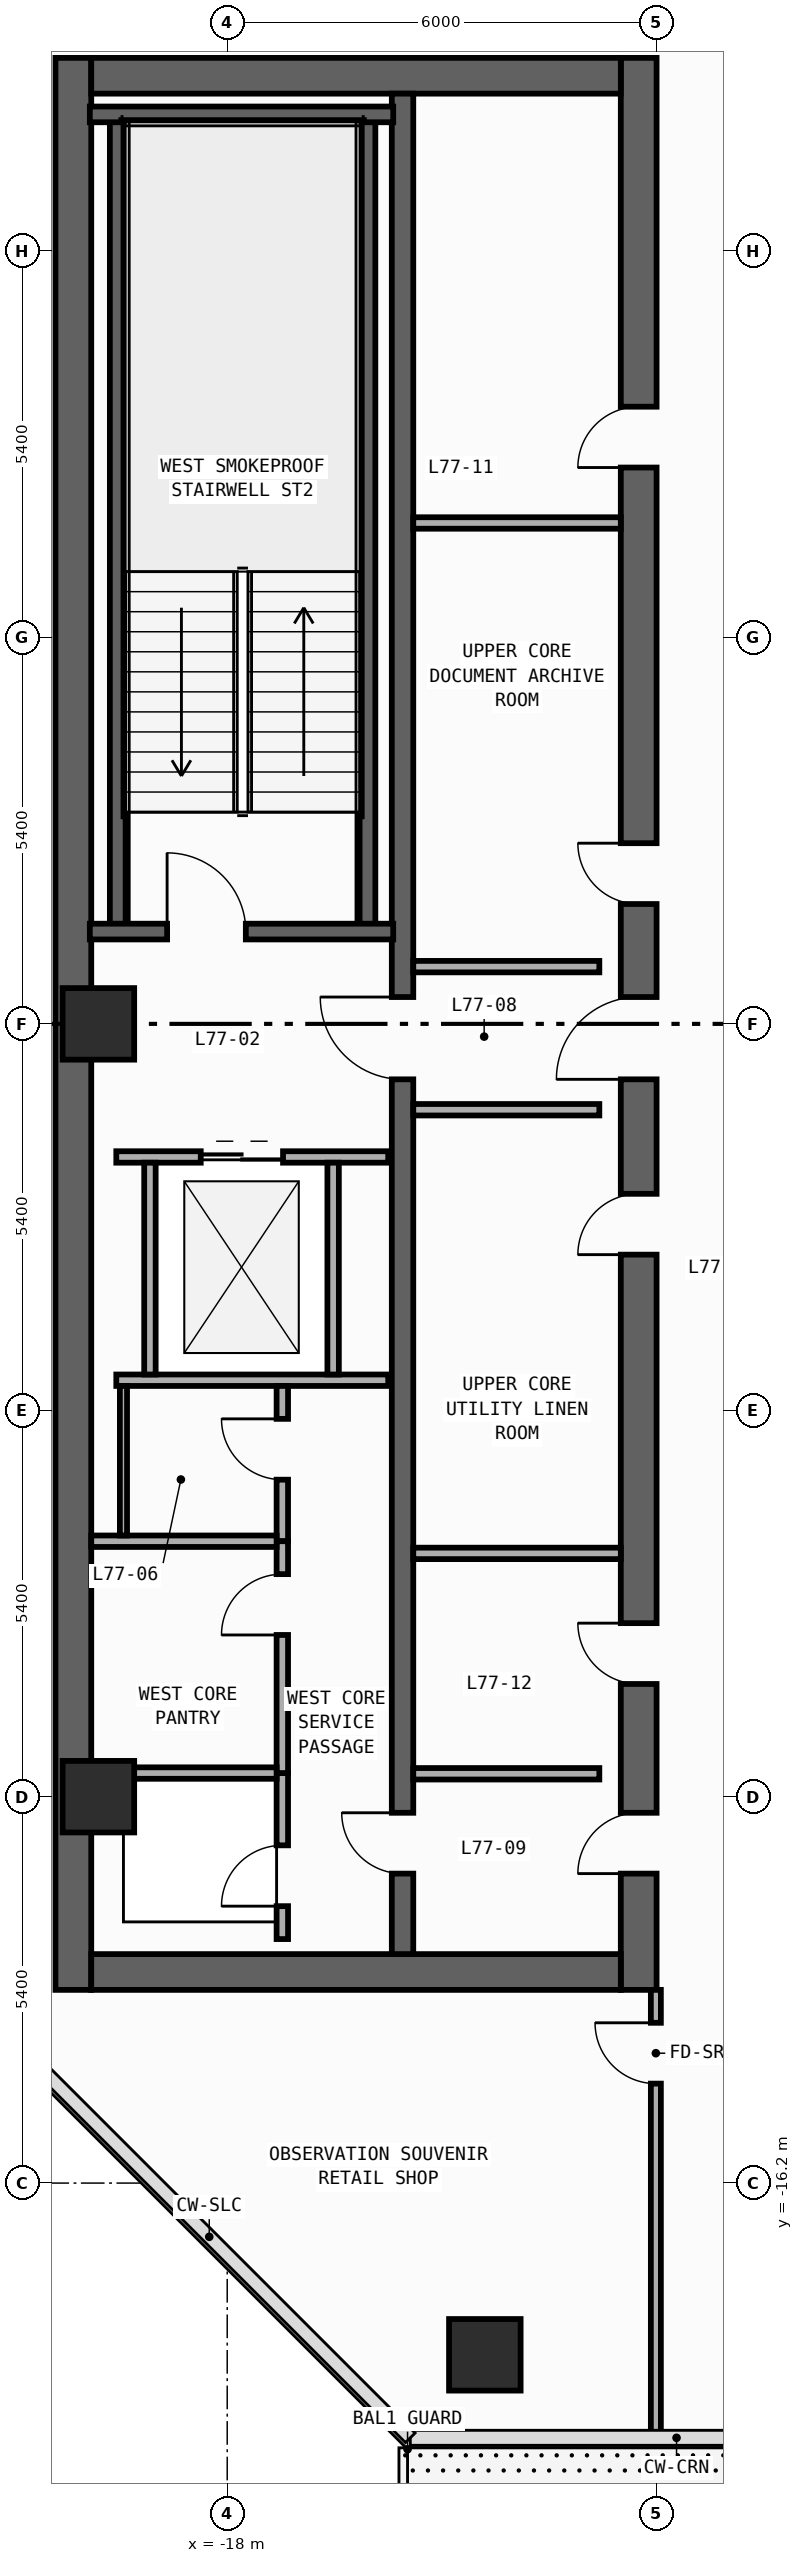
"""IFC4 building model, lengths in metres.
Left out: names, types, materials, properties, quantities, classifications, styles, units other than length and angle.
Written with IfcOpenShell. Run it as: python <this file> out.ifc"""

import sys

from ifc_helpers import new_model, si_unit, direction, frame, frame_2d, origin, origin_2d, place, context, subcontext, project, spatial, rectangle, circle, extrude, element, fill, save


model = new_model("IFC4")
c1 = context("Model", 3, precision=1e-05, world=origin(), true_north=direction((0.0, 1.0)))
c2 = subcontext(c1, "Body", "Model", "MODEL_VIEW")
j1 = project(units=[si_unit("LENGTHUNIT", "METRE"), si_unit("PLANEANGLEUNIT", "RADIAN")], contexts=[c1])
p1 = place(None, origin())
s1 = spatial("IfcSite", under=j1, at=p1, CompositionType="ELEMENT")
p2 = place(p1, origin())
s2 = spatial("IfcBuilding", under=s1, at=p2, CompositionType="ELEMENT")
p3 = place(p2, frame((0.0, 0.0, 320.4)))
s3 = spatial("IfcBuildingStorey", under=s2, at=p3, CompositionType="ELEMENT", Elevation=320.4)
p4 = place(p3, frame((-20.15, -13.5, 0.0), z_axis=(0.0, 0.0, 1.0), x_axis=(0.0, 1.0, 0.0)))
e1 = element("IfcWall", 1, at=p4, inside=s3, PredefinedType="SHEAR", context=c2, shape_type="SweptSolid", body=[
    extrude(rectangle(XDim=27.0, YDim=0.5, at=frame_2d((13.5, 0.0))), origin(), (0.0, 0.0, 1.0), 4.45),
])
p5 = place(p3, frame((-12.25, -13.5, 0.0), z_axis=(0.0, 0.0, 1.0), x_axis=(0.0, 1.0, 0.0)))
e2 = element("IfcWall", 2, at=p5, inside=s3, PredefinedType="SHEAR", context=c2, shape_type="SweptSolid", body=[
    extrude(rectangle(XDim=27.0, YDim=0.5, at=frame_2d((13.5, 0.0))), origin(), (0.0, 0.0, 1.0), 4.45),
])
p6 = place(p5, frame((15.175, 0.0, 0.0)))
e3 = element("IfcOpeningElement", 3, at=p6, cuts=e2, PredefinedType="OPENING", context=c2, shape_type="SweptSolid", body=[
    extrude(rectangle(XDim=0.85, YDim=2.1, at=frame_2d((0.425, 1.05))), frame((0.0, 0.26, 0.0), z_axis=(0.0, -1.0, 0.0), x_axis=(1.0, 0.0, 0.0)), (0.0, 0.0, 1.0), 0.52),
])
p7 = place(p5, frame((21.275, 0.0, 0.0)))
e4 = element("IfcOpeningElement", 4, at=p7, cuts=e2, PredefinedType="OPENING", context=c2, shape_type="SweptSolid", body=[
    extrude(rectangle(XDim=0.85, YDim=2.1, at=frame_2d((0.425, 1.05))), frame((0.0, 0.26, 0.0), z_axis=(0.0, -1.0, 0.0), x_axis=(1.0, 0.0, 0.0)), (0.0, 0.0, 1.0), 0.52),
])
p8 = place(p5, frame((4.275, 0.0, 0.0)))
e5 = element("IfcOpeningElement", 5, at=p8, cuts=e2, PredefinedType="OPENING", context=c2, shape_type="SweptSolid", body=[
    extrude(rectangle(XDim=0.85, YDim=2.1, at=frame_2d((0.425, 1.05))), frame((0.0, 0.26, 0.0), z_axis=(0.0, -1.0, 0.0), x_axis=(1.0, 0.0, 0.0)), (0.0, 0.0, 1.0), 0.52),
])
p9 = place(p5, frame((10.275, 0.0, 0.0)))
e6 = element("IfcOpeningElement", 6, at=p9, cuts=e2, PredefinedType="OPENING", context=c2, shape_type="SweptSolid", body=[
    extrude(rectangle(XDim=0.85, YDim=2.1, at=frame_2d((0.425, 1.05))), frame((0.0, 0.26, 0.0), z_axis=(0.0, -1.0, 0.0), x_axis=(1.0, 0.0, 0.0)), (0.0, 0.0, 1.0), 0.52),
])
p10 = place(p5, frame((12.725, 0.0, 0.0)))
e7 = element("IfcOpeningElement", 7, at=p10, cuts=e2, PredefinedType="OPENING", context=c2, shape_type="SweptSolid", body=[
    extrude(rectangle(XDim=1.15, YDim=2.2, at=frame_2d((0.575, 1.1))), frame((0.0, 0.26, 0.0), z_axis=(0.0, -1.0, 0.0), x_axis=(1.0, 0.0, 0.0)), (0.0, 0.0, 1.0), 0.52),
])
p11 = place(p5, frame((1.625, 0.0, 0.0)))
e8 = element("IfcOpeningElement", 8, at=p11, cuts=e2, PredefinedType="OPENING", context=c2, shape_type="SweptSolid", body=[
    extrude(rectangle(XDim=0.85, YDim=2.1, at=frame_2d((0.425, 1.05))), frame((0.0, 0.26, 0.0), z_axis=(0.0, -1.0, 0.0), x_axis=(1.0, 0.0, 0.0)), (0.0, 0.0, 1.0), 0.52),
])
for number, where, z_axis, x_axis in (
    (9, (-19.9, -13.25, 0.0), (0.0, 0.0, 1.0), (1.0, 0.0, 0.0)),
    (10, (-19.9, 13.25, 0.0), (0.0, 0.0, 1.0), (1.0, 0.0, 0.0)),
):
    element("IfcWall", number, at=place(p3, frame(where, z_axis=z_axis, x_axis=x_axis)), inside=s3, PredefinedType="SHEAR", context=c2, shape_type="SweptSolid", body=[
        extrude(rectangle(XDim=7.4, YDim=0.5, at=frame_2d((3.7, 0.0))), origin(), (0.0, 0.0, 1.0), 4.45),
    ])
p12 = place(p3, frame((-15.55, -13.0, 0.0), z_axis=(0.0, 0.0, 1.0), x_axis=(0.0, 1.0, 0.0)))
e11 = element("IfcWall", 11, at=p12, inside=s3, PredefinedType="SHEAR", context=c2, shape_type="SweptSolid", body=[
    extrude(rectangle(XDim=26.0, YDim=0.3, at=frame_2d((13.0, 0.0))), origin(), (0.0, 0.0, 1.0), 4.45),
])
p13 = place(p12, frame((12.225, 0.0, 0.0)))
e12 = element("IfcOpeningElement", 12, at=p13, cuts=e11, PredefinedType="OPENING", context=c2, shape_type="SweptSolid", body=[
    extrude(rectangle(XDim=1.15, YDim=2.2, at=frame_2d((0.575, 1.1))), frame((0.0, 0.16, 0.0), z_axis=(0.0, -1.0, 0.0), x_axis=(1.0, 0.0, 0.0)), (0.0, 0.0, 1.0), 0.32),
])
p14 = place(p12, frame((1.125, 0.0, 0.0)))
e13 = element("IfcOpeningElement", 13, at=p14, cuts=e11, PredefinedType="OPENING", context=c2, shape_type="SweptSolid", body=[
    extrude(rectangle(XDim=0.85, YDim=2.1, at=frame_2d((0.425, 1.05))), frame((0.0, 0.16, 0.0), z_axis=(0.0, -1.0, 0.0), x_axis=(1.0, 0.0, 0.0)), (0.0, 0.0, 1.0), 0.32),
])
for number, where, z_axis, x_axis in (
    (14, (-16.04, 1.29, 0.0), (0.0, 0.0, 1.0), (0.0, 1.0, 0.0)),
    (15, (-19.53, 1.29, 0.0), (0.0, 0.0, 1.0), (0.0, 1.0, 0.0)),
):
    element("IfcWall", number, at=place(p3, frame(where, z_axis=z_axis, x_axis=x_axis)), inside=s3, PredefinedType="SHEAR", context=c2, shape_type="SweptSolid", body=[
        extrude(rectangle(XDim=11.42, YDim=0.22, at=frame_2d((5.71, 0.0))), origin(), (0.0, 0.0, 1.0), 4.45),
    ])
p15 = place(p3, frame((-19.92, 12.71, 0.0), z_axis=(0.0, 0.0, 1.0), x_axis=(1.0, 0.0, 0.0)))
e16 = element("IfcWall", 16, at=p15, inside=s3, PredefinedType="SHEAR", context=c2, shape_type="SweptSolid", body=[
    extrude(rectangle(XDim=4.24, YDim=0.22, at=frame_2d((2.12, 0.0))), origin(), (0.0, 0.0, 1.0), 4.45),
])
p16 = place(p3, frame((-19.92, 1.29, 0.0), z_axis=(0.0, 0.0, 1.0), x_axis=(1.0, 0.0, 0.0)))
e17 = element("IfcWall", 17, at=p16, inside=s3, PredefinedType="SHEAR", context=c2, shape_type="SweptSolid", body=[
    extrude(rectangle(XDim=4.24, YDim=0.22, at=frame_2d((2.12, 0.0))), origin(), (0.0, 0.0, 1.0), 4.45),
])
p17 = place(p16, frame((1.08, 0.0, 0.0)))
e18 = element("IfcOpeningElement", 18, at=p17, cuts=e17, PredefinedType="OPENING", context=c2, shape_type="SweptSolid", body=[
    extrude(rectangle(XDim=1.1, YDim=2.2, at=frame_2d((0.55, 1.1))), frame((0.0, 0.12, 0.0), z_axis=(0.0, -1.0, 0.0), x_axis=(1.0, 0.0, 0.0)), (0.0, 0.0, 1.0), 0.24),
])
for number, where, z_axis, x_axis in (
    (19, (-14.4, -18.6, 0.0), (0.0, 0.0, 1.0), (1.0, 0.0, 0.0)),
    (20, (-19.8, -10.8, 0.0), (0.0, 0.0, 1.0), (1.0, 0.0, 0.0)),
    (21, (-19.8, 0.0, 0.0), (0.0, 0.0, 1.0), (1.0, 0.0, 0.0)),
):
    element("IfcColumn", number, at=place(p3, frame(where, z_axis=z_axis, x_axis=x_axis)), inside=s3, PredefinedType="COLUMN", context=c2, shape_type="SweptSolid", body=[
        extrude(circle(Radius=0.5, at=origin_2d()), origin(), (0.0, 0.0, 1.0), 4.8),
    ])
p18 = place(p3, frame((-19.55, -1.86, 0.0), z_axis=(0.0, 0.0, 1.0), x_axis=(1.0, 0.0, 0.0)))
e22 = element("IfcWall", 22, at=p18, inside=s3, PredefinedType="STANDARD", context=c2, shape_type="SweptSolid", body=[
    extrude(rectangle(XDim=3.8, YDim=0.16, at=frame_2d((1.9, 0.0))), origin(), (0.0, 0.0, 1.0), 4.45),
])
p19 = place(p18, frame((1.18, 0.0, 0.0)))
e23 = element("IfcOpeningElement", 23, at=p19, cuts=e22, PredefinedType="OPENING", context=c2, shape_type="SweptSolid", body=[
    extrude(rectangle(XDim=1.15, YDim=2.2, at=frame_2d((0.575, 1.1))), frame((0.0, 0.09, 0.0), z_axis=(0.0, -1.0, 0.0), x_axis=(1.0, 0.0, 0.0)), (0.0, 0.0, 1.0), 0.18),
])
p20 = place(p3, frame((-19.55, -4.98, 0.0), z_axis=(0.0, 0.0, 1.0), x_axis=(1.0, 0.0, 0.0)))
e24 = element("IfcWall", 24, at=p20, inside=s3, PredefinedType="STANDARD", context=c2, shape_type="SweptSolid", body=[
    extrude(rectangle(XDim=3.8, YDim=0.16, at=frame_2d((1.9, 0.0))), origin(), (0.0, 0.0, 1.0), 4.45),
])
for number, where, z_axis, x_axis in (
    (25, (-19.08, -4.9, 0.0), (0.0, 0.0, 1.0), (0.0, 1.0, 0.0)),
    (26, (-16.52, -4.9, 0.0), (0.0, 0.0, 1.0), (0.0, 1.0, 0.0)),
):
    element("IfcWall", number, at=place(p3, frame(where, z_axis=z_axis, x_axis=x_axis)), inside=s3, PredefinedType="STANDARD", context=c2, shape_type="SweptSolid", body=[
        extrude(rectangle(XDim=2.96, YDim=0.16, at=frame_2d((1.48, 0.0))), origin(), (0.0, 0.0, 1.0), 4.45),
    ])
for number, where, z_axis, x_axis in (
    (27, (-15.4, 0.8, 0.0), (0.0, 0.0, 1.0), (1.0, 0.0, 0.0)),
    (28, (-15.4, -1.2, 0.0), (0.0, 0.0, 1.0), (1.0, 0.0, 0.0)),
    (29, (-15.4, -10.48, 0.0), (0.0, 0.0, 1.0), (1.0, 0.0, 0.0)),
):
    element("IfcWall", number, at=place(p3, frame(where, z_axis=z_axis, x_axis=x_axis)), inside=s3, PredefinedType="STANDARD", context=c2, shape_type="SweptSolid", body=[
        extrude(rectangle(XDim=2.6, YDim=0.16, at=frame_2d((1.3, 0.0))), origin(), (0.0, 0.0, 1.0), 4.45),
    ])
p21 = place(p3, frame((-17.23, -12.79, 0.0), z_axis=(0.0, 0.0, 1.0), x_axis=(0.0, 1.0, 0.0)))
e30 = element("IfcWall", 30, at=p21, inside=s3, PredefinedType="PARTITIONING", context=c2, shape_type="SweptSolid", body=[
    extrude(rectangle(XDim=2.32, YDim=0.16, at=frame_2d((1.16, 0.0))), origin(), (0.0, 0.0, 1.0), 4.45),
])
p22 = place(p21, frame((0.46, 0.0, 0.0)))
e31 = element("IfcOpeningElement", 31, at=p22, cuts=e30, PredefinedType="OPENING", context=c2, shape_type="SweptSolid", body=[
    extrude(rectangle(XDim=0.85, YDim=2.1, at=frame_2d((0.425, 1.05))), frame((0.0, 0.09, 0.0), z_axis=(0.0, -1.0, 0.0), x_axis=(1.0, 0.0, 0.0)), (0.0, 0.0, 1.0), 0.18),
])
p23 = place(p3, frame((-17.23, -7.23, 0.0), z_axis=(0.0, 0.0, 1.0), x_axis=(0.0, 1.0, 0.0)))
e32 = element("IfcWall", 32, at=p23, inside=s3, PredefinedType="PARTITIONING", context=c2, shape_type="SweptSolid", body=[
    extrude(rectangle(XDim=2.17, YDim=0.16, at=frame_2d((1.085, 0.0))), origin(), (0.0, 0.0, 1.0), 4.45),
])
p24 = place(p23, frame((0.86, 0.0, 0.0)))
e33 = element("IfcOpeningElement", 33, at=p24, cuts=e32, PredefinedType="OPENING", context=c2, shape_type="SweptSolid", body=[
    extrude(rectangle(XDim=0.85, YDim=2.1, at=frame_2d((0.425, 1.05))), frame((0.0, 0.09, 0.0), z_axis=(0.0, -1.0, 0.0), x_axis=(1.0, 0.0, 0.0)), (0.0, 0.0, 1.0), 0.18),
])
p25 = place(p3, frame((-17.23, -10.47, 0.0), z_axis=(0.0, 0.0, 1.0), x_axis=(0.0, 1.0, 0.0)))
e34 = element("IfcWall", 34, at=p25, inside=s3, PredefinedType="PARTITIONING", context=c2, shape_type="SweptSolid", body=[
    extrude(rectangle(XDim=3.24, YDim=0.16, at=frame_2d((1.62, 0.0))), origin(), (0.0, 0.0, 1.0), 4.45),
])
p26 = place(p25, frame((1.93, 0.0, 0.0)))
e35 = element("IfcOpeningElement", 35, at=p26, cuts=e34, PredefinedType="OPENING", context=c2, shape_type="SweptSolid", body=[
    extrude(rectangle(XDim=0.85, YDim=2.1, at=frame_2d((0.425, 1.05))), frame((0.0, 0.09, 0.0), z_axis=(0.0, -1.0, 0.0), x_axis=(1.0, 0.0, 0.0)), (0.0, 0.0, 1.0), 0.18),
])
p27 = place(p3, frame((-19.75, -10.47, 0.0), z_axis=(0.0, 0.0, 1.0), x_axis=(1.0, 0.0, 0.0)))
e36 = element("IfcWall", 36, at=p27, inside=s3, PredefinedType="PARTITIONING", context=c2, shape_type="SweptSolid", body=[
    extrude(rectangle(XDim=2.44, YDim=0.16, at=frame_2d((1.22, 0.0))), origin(), (0.0, 0.0, 1.0), 4.45),
])
p28 = place(p3, frame((-19.9, -7.23, 0.0), z_axis=(0.0, 0.0, 1.0), x_axis=(1.0, 0.0, 0.0)))
e37 = element("IfcWall", 37, at=p28, inside=s3, PredefinedType="PARTITIONING", context=c2, shape_type="SweptSolid", body=[
    extrude(rectangle(XDim=2.59, YDim=0.16, at=frame_2d((1.295, 0.0))), origin(), (0.0, 0.0, 1.0), 4.45),
])
for number, where, z_axis, x_axis in (
    (38, (-15.4, 7.0, 0.0), (0.0, 0.0, 1.0), (1.0, 0.0, 0.0)),
    (39, (-15.4, -7.4, 0.0), (0.0, 0.0, 1.0), (1.0, 0.0, 0.0)),
):
    element("IfcWall", number, at=place(p3, frame(where, z_axis=z_axis, x_axis=x_axis)), inside=s3, PredefinedType="PARTITIONING", context=c2, shape_type="SweptSolid", body=[
        extrude(rectangle(XDim=2.9, YDim=0.16, at=frame_2d((1.45, 0.0))), origin(), (0.0, 0.0, 1.0), 4.45),
    ])
p29 = place(p3, frame((-12.01, -19.755, 0.0), z_axis=(0.0, 0.0, 1.0), x_axis=(0.0, 1.0, 0.0)))
e40 = element("IfcWall", 40, at=p29, inside=s3, PredefinedType="PARTITIONING", context=c2, shape_type="SweptSolid", body=[
    extrude(rectangle(XDim=6.255, YDim=0.14, at=frame_2d((3.127, 0.0))), origin(), (0.0, 0.0, 1.0), 4.45),
])
p30 = place(p29, frame((4.945, 0.0, 0.0)))
e41 = element("IfcOpeningElement", 41, at=p30, cuts=e40, PredefinedType="OPENING", context=c2, shape_type="SweptSolid", body=[
    extrude(rectangle(XDim=0.85, YDim=2.1, at=frame_2d((0.425, 1.05))), frame((0.0, 0.08, 0.0), z_axis=(0.0, -1.0, 0.0), x_axis=(1.0, 0.0, 0.0)), (0.0, 0.0, 1.0), 0.16),
])
p31 = place(p3, frame((-19.45, -7.15, 0.0), z_axis=(0.0, 0.0, 1.0), x_axis=(0.0, 1.0, 0.0)))
e42 = element("IfcWall", 42, at=p31, inside=s3, PredefinedType="PARTITIONING", context=c2, shape_type="SweptSolid", body=[
    extrude(rectangle(XDim=2.09, YDim=0.1, at=frame_2d((1.045, 0.0))), origin(), (0.0, 0.0, 1.0), 4.45),
])
p32 = place(p17, origin())
e43 = element("IfcDoor", 43, at=p32, inside=s3, OperationType="SINGLE_SWING_LEFT", PredefinedType="DOOR", context=c2, shape_type="SweptSolid", body=[
    extrude(rectangle(XDim=1.1, YDim=2.2, at=frame_2d((0.55, 1.1))), frame((0.0, 0.025, 0.0), z_axis=(0.0, -1.0, 0.0), x_axis=(1.0, 0.0, 0.0)), (0.0, 0.0, 1.0), 0.05),
])
fill(e18, e43)
p33 = place(p6, origin())
e44 = element("IfcDoor", 44, at=p33, inside=s3, OperationType="SINGLE_SWING_RIGHT", PredefinedType="DOOR", context=c2, shape_type="SweptSolid", body=[
    extrude(rectangle(XDim=0.85, YDim=2.1, at=frame_2d((0.425, 1.05))), frame((0.0, 0.025, 0.0), z_axis=(0.0, -1.0, 0.0), x_axis=(1.0, 0.0, 0.0)), (0.0, 0.0, 1.0), 0.05),
])
fill(e3, e44)
p34 = place(p7, origin())
e45 = element("IfcDoor", 45, at=p34, inside=s3, OperationType="SINGLE_SWING_LEFT", PredefinedType="DOOR", context=c2, shape_type="SweptSolid", body=[
    extrude(rectangle(XDim=0.85, YDim=2.1, at=frame_2d((0.425, 1.05))), frame((0.0, 0.025, 0.0), z_axis=(0.0, -1.0, 0.0), x_axis=(1.0, 0.0, 0.0)), (0.0, 0.0, 1.0), 0.05),
])
fill(e4, e45)
p35 = place(p8, origin())
e46 = element("IfcDoor", 46, at=p35, inside=s3, OperationType="SINGLE_SWING_RIGHT", PredefinedType="DOOR", context=c2, shape_type="SweptSolid", body=[
    extrude(rectangle(XDim=0.85, YDim=2.1, at=frame_2d((0.425, 1.05))), frame((0.0, 0.025, 0.0), z_axis=(0.0, -1.0, 0.0), x_axis=(1.0, 0.0, 0.0)), (0.0, 0.0, 1.0), 0.05),
])
fill(e5, e46)
p36 = place(p9, origin())
e47 = element("IfcDoor", 47, at=p36, inside=s3, OperationType="SINGLE_SWING_LEFT", PredefinedType="DOOR", context=c2, shape_type="SweptSolid", body=[
    extrude(rectangle(XDim=0.85, YDim=2.1, at=frame_2d((0.425, 1.05))), frame((0.0, 0.025, 0.0), z_axis=(0.0, -1.0, 0.0), x_axis=(1.0, 0.0, 0.0)), (0.0, 0.0, 1.0), 0.05),
])
fill(e6, e47)
p37 = place(p10, origin())
e48 = element("IfcDoor", 48, at=p37, inside=s3, OperationType="SINGLE_SWING_LEFT", PredefinedType="DOOR", context=c2, shape_type="SweptSolid", body=[
    extrude(rectangle(XDim=1.15, YDim=2.2, at=frame_2d((0.575, 1.1))), frame((0.0, 0.025, 0.0), z_axis=(0.0, -1.0, 0.0), x_axis=(1.0, 0.0, 0.0)), (0.0, 0.0, 1.0), 0.05),
])
fill(e7, e48)
p38 = place(p13, origin())
e49 = element("IfcDoor", 49, at=p38, inside=s3, OperationType="SINGLE_SWING_RIGHT", PredefinedType="DOOR", context=c2, shape_type="SweptSolid", body=[
    extrude(rectangle(XDim=1.15, YDim=2.2, at=frame_2d((0.575, 1.1))), frame((0.0, 0.025, 0.0), z_axis=(0.0, -1.0, 0.0), x_axis=(1.0, 0.0, 0.0)), (0.0, 0.0, 1.0), 0.05),
])
fill(e12, e49)
p39 = place(p11, origin())
e50 = element("IfcDoor", 50, at=p39, inside=s3, OperationType="SINGLE_SWING_LEFT", PredefinedType="DOOR", context=c2, shape_type="SweptSolid", body=[
    extrude(rectangle(XDim=0.85, YDim=2.1, at=frame_2d((0.425, 1.05))), frame((0.0, 0.025, 0.0), z_axis=(0.0, -1.0, 0.0), x_axis=(1.0, 0.0, 0.0)), (0.0, 0.0, 1.0), 0.05),
])
fill(e8, e50)
p40 = place(p14, origin())
e51 = element("IfcDoor", 51, at=p40, inside=s3, OperationType="SINGLE_SWING_RIGHT", PredefinedType="DOOR", context=c2, shape_type="SweptSolid", body=[
    extrude(rectangle(XDim=0.85, YDim=2.1, at=frame_2d((0.425, 1.05))), frame((0.0, 0.025, 0.0), z_axis=(0.0, -1.0, 0.0), x_axis=(1.0, 0.0, 0.0)), (0.0, 0.0, 1.0), 0.05),
])
fill(e13, e51)
p41 = place(p19, origin())
e52 = element("IfcDoor", 52, at=p41, inside=s3, OperationType="DOUBLE_DOOR_SLIDING", PredefinedType="DOOR", context=c2, shape_type="SweptSolid", body=[
    extrude(rectangle(XDim=1.15, YDim=2.2, at=frame_2d((0.575, 1.1))), frame((0.0, 0.025, 0.0), z_axis=(0.0, -1.0, 0.0), x_axis=(1.0, 0.0, 0.0)), (0.0, 0.0, 1.0), 0.05),
])
fill(e23, e52)
p42 = place(p22, origin())
e53 = element("IfcDoor", 53, at=p42, inside=s3, OperationType="SINGLE_SWING_LEFT", PredefinedType="DOOR", context=c2, shape_type="SweptSolid", body=[
    extrude(rectangle(XDim=0.85, YDim=2.1, at=frame_2d((0.425, 1.05))), frame((0.0, 0.025, 0.0), z_axis=(0.0, -1.0, 0.0), x_axis=(1.0, 0.0, 0.0)), (0.0, 0.0, 1.0), 0.05),
])
fill(e31, e53)
p43 = place(p24, origin())
e54 = element("IfcDoor", 54, at=p43, inside=s3, OperationType="SINGLE_SWING_RIGHT", PredefinedType="DOOR", context=c2, shape_type="SweptSolid", body=[
    extrude(rectangle(XDim=0.85, YDim=2.1, at=frame_2d((0.425, 1.05))), frame((0.0, 0.025, 0.0), z_axis=(0.0, -1.0, 0.0), x_axis=(1.0, 0.0, 0.0)), (0.0, 0.0, 1.0), 0.05),
])
fill(e33, e54)
p44 = place(p26, origin())
e55 = element("IfcDoor", 55, at=p44, inside=s3, OperationType="SINGLE_SWING_LEFT", PredefinedType="DOOR", context=c2, shape_type="SweptSolid", body=[
    extrude(rectangle(XDim=0.85, YDim=2.1, at=frame_2d((0.425, 1.05))), frame((0.0, 0.025, 0.0), z_axis=(0.0, -1.0, 0.0), x_axis=(1.0, 0.0, 0.0)), (0.0, 0.0, 1.0), 0.05),
])
fill(e35, e55)
p45 = place(p30, origin())
e56 = element("IfcDoor", 56, at=p45, inside=s3, OperationType="SINGLE_SWING_RIGHT", PredefinedType="DOOR", context=c2, shape_type="SweptSolid", body=[
    extrude(rectangle(XDim=0.85, YDim=2.1, at=frame_2d((0.425, 1.05))), frame((0.0, 0.025, 0.0), z_axis=(0.0, -1.0, 0.0), x_axis=(1.0, 0.0, 0.0)), (0.0, 0.0, 1.0), 0.05),
])
fill(e41, e56)
save(model, sys.argv[1])
